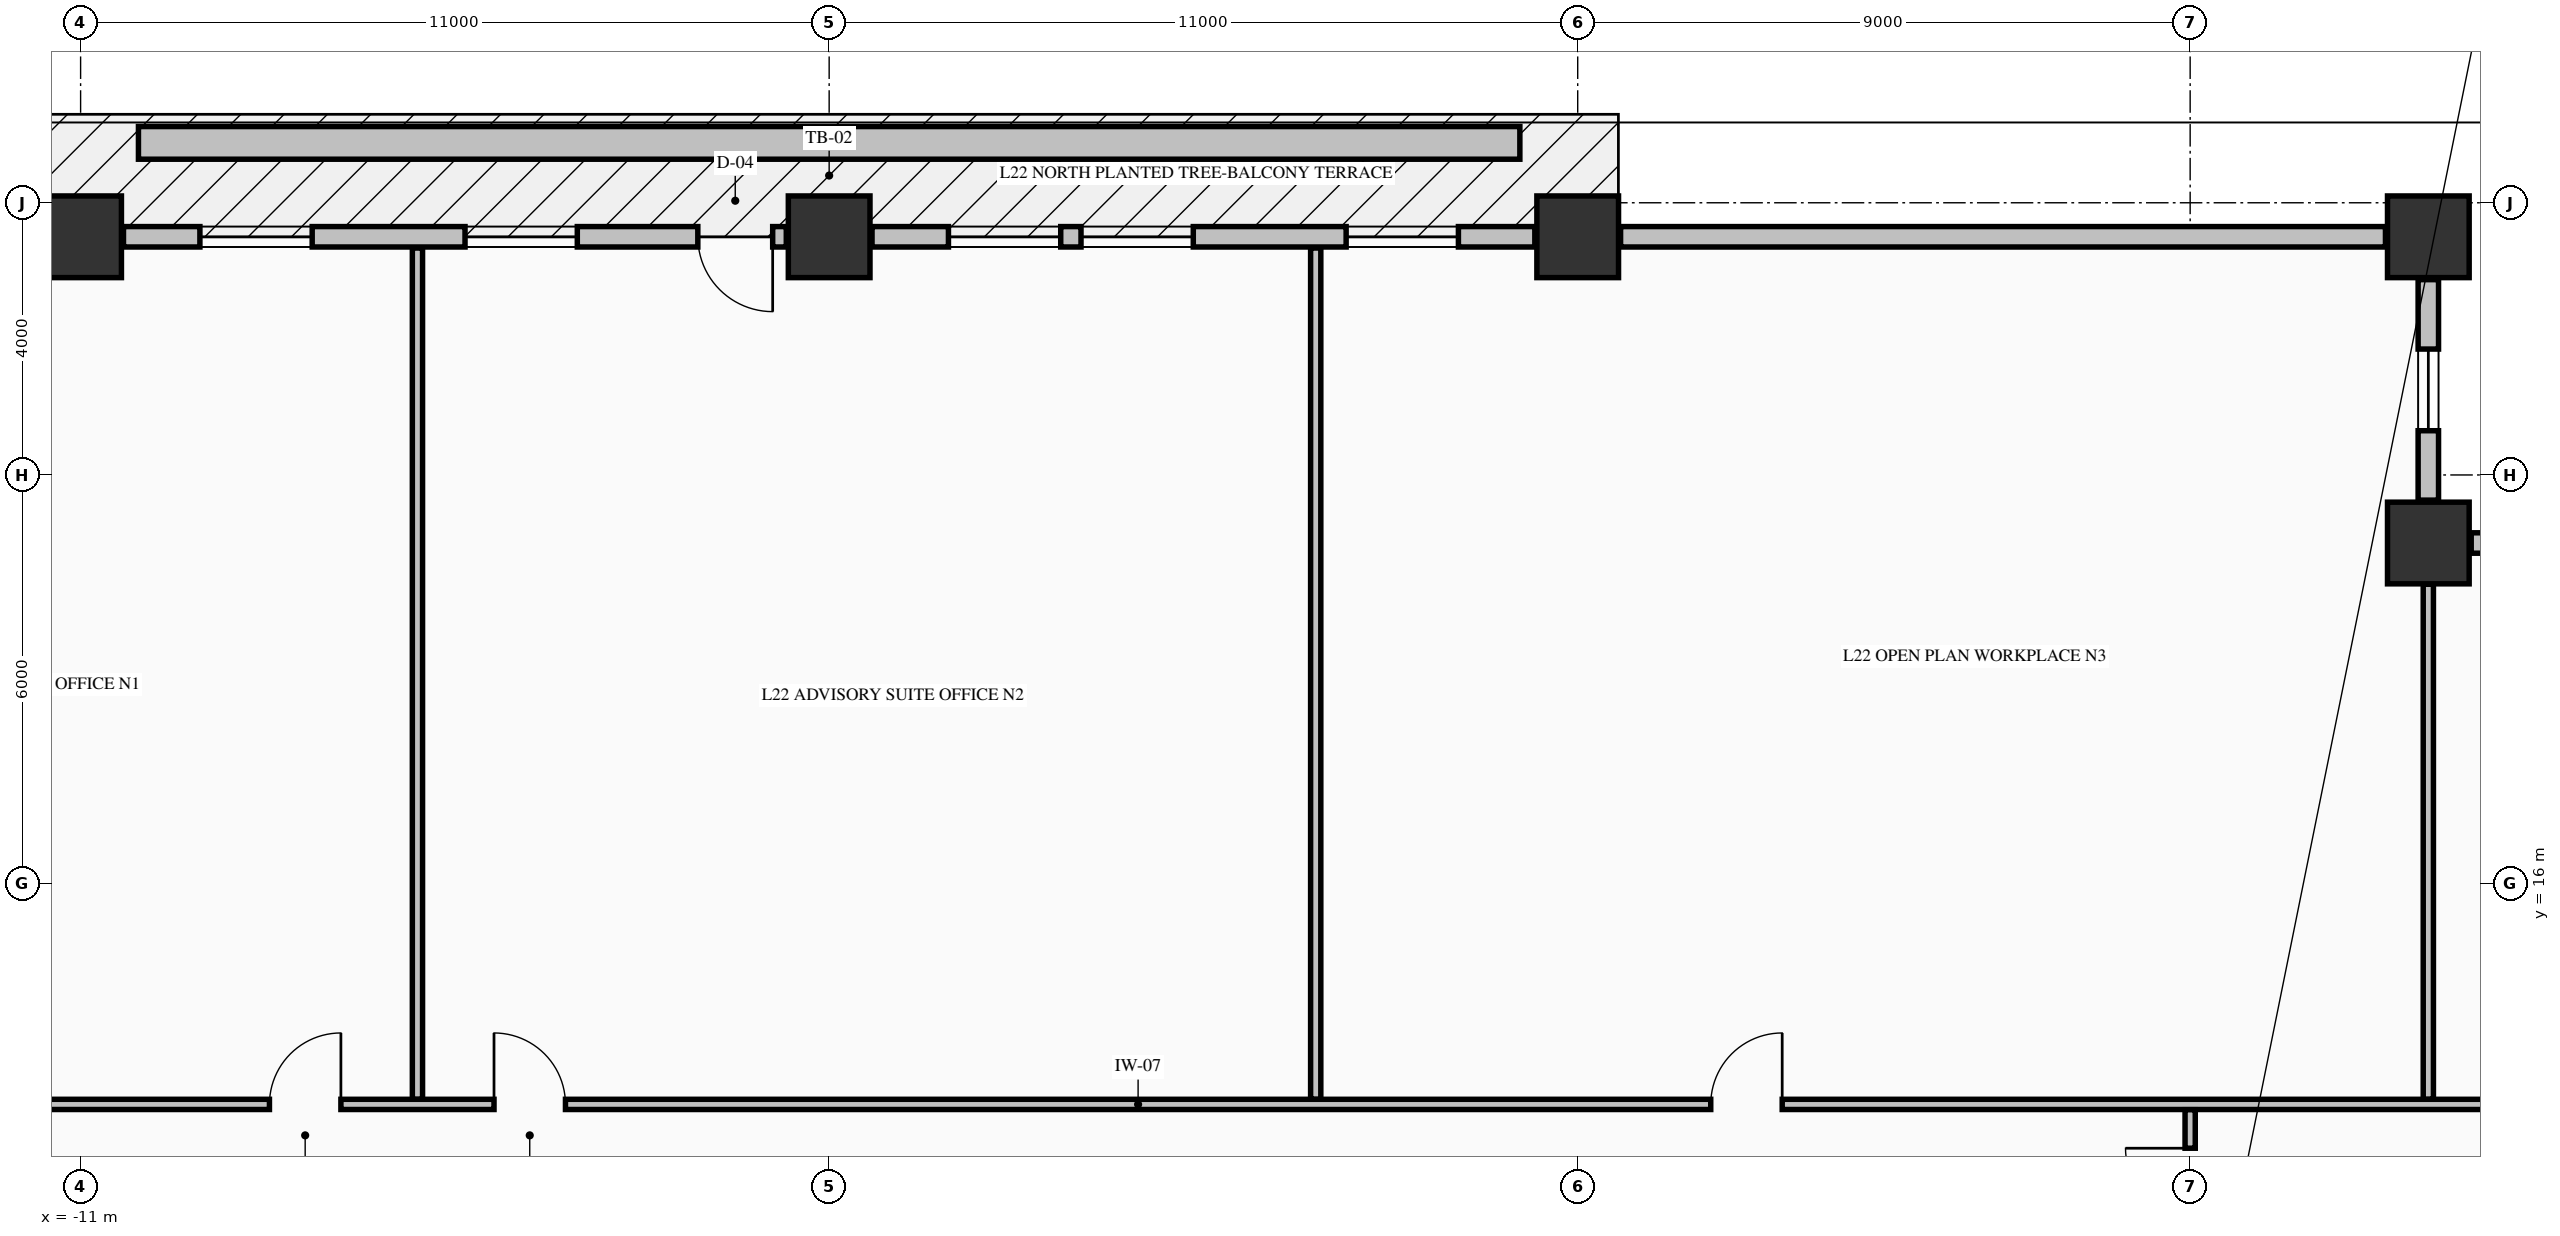
"""IFC4 building model, lengths in metres.
Left out: names, types, materials, properties, quantities, classifications, styles, units other than length and angle.
Written with IfcOpenShell. Run it as: python <this file> out.ifc"""

import sys

from ifc_helpers import new_model, si_unit, direction, frame, frame_2d, origin, origin_2d, place, context, subcontext, project, spatial, rectangle, extrude, element, fill, save


model = new_model("IFC4")
c1 = context("Model", 3, precision=1e-05, world=origin(), true_north=direction((0.0, 1.0)))
c2 = subcontext(c1, "Body", "Model", "MODEL_VIEW")
j1 = project(units=[si_unit("LENGTHUNIT", "METRE"), si_unit("PLANEANGLEUNIT", "RADIAN")], contexts=[c1])
p1 = place(None, origin())
s1 = spatial("IfcSite", under=j1, at=p1, CompositionType="ELEMENT")
p2 = place(p1, origin())
s2 = spatial("IfcBuilding", under=s1, at=p2, CompositionType="ELEMENT")
p3 = place(p2, frame((0.0, 0.0, 91.36)))
s3 = spatial("IfcBuildingStorey", under=s2, at=p3, CompositionType="ELEMENT", Elevation=91.36)
for number, where, z_axis, x_axis in (
    (1, (-11.0, 25.5, -0.25), (0.0, 0.0, 1.0), (1.0, 0.0, 0.0)),
    (2, (0.0, 25.5, -0.25), (0.0, 0.0, 1.0), (1.0, 0.0, 0.0)),
    (3, (11.0, 25.5, -0.25), (0.0, 0.0, 1.0), (1.0, 0.0, 0.0)),
    (4, (23.5, 25.5, -0.25), (0.0, 0.0, 1.0), (1.0, 0.0, 0.0)),
    (5, (23.5, 21.0, -0.25), (0.0, 0.0, 1.0), (1.0, 0.0, 0.0)),
):
    element("IfcColumn", number, at=place(p3, frame(where, z_axis=z_axis, x_axis=x_axis)), inside=s3, PredefinedType="COLUMN", context=c2, shape_type="SweptSolid", body=[
        extrude(rectangle(XDim=1.2, YDim=1.2, at=origin_2d()), origin(), (0.0, 0.0, 1.0), 3.57),
    ])
p4 = place(p3, frame((27.37, 21.0, 0.0), z_axis=(0.0, 0.0, 1.0), x_axis=(-1.0, 0.0, 0.0)))
e6 = element("IfcWall", 6, at=p4, inside=s3, PredefinedType="STANDARD", context=c2, shape_type="SweptSolid", body=[
    extrude(rectangle(XDim=3.24, YDim=0.3, at=frame_2d((1.62, 0.0))), origin(), (0.0, 0.0, 1.0), 2.712),
])
p5 = place(p4, frame((1.02, 0.0, 0.82)))
e7 = element("IfcOpeningElement", 7, at=p5, cuts=e6, PredefinedType="OPENING", context=c2, shape_type="SweptSolid", body=[
    extrude(rectangle(XDim=1.2, YDim=1.65, at=frame_2d((0.6, 0.825))), frame((0.0, 0.16, 0.0), z_axis=(0.0, -1.0, 0.0), x_axis=(1.0, 0.0, 0.0)), (0.0, 0.0, 1.0), 0.32),
])
p6 = place(p3, frame((23.5, 21.63, 0.0), z_axis=(0.0, 0.0, 1.0), x_axis=(0.0, 1.0, 0.0)))
e8 = element("IfcWall", 8, at=p6, inside=s3, PredefinedType="STANDARD", context=c2, shape_type="SweptSolid", body=[
    extrude(rectangle(XDim=3.24, YDim=0.3, at=frame_2d((1.62, 0.0))), origin(), (0.0, 0.0, 1.0), 2.712),
])
p7 = place(p6, frame((1.02, 0.0, 0.82)))
e9 = element("IfcOpeningElement", 9, at=p7, cuts=e8, PredefinedType="OPENING", context=c2, shape_type="SweptSolid", body=[
    extrude(rectangle(XDim=1.2, YDim=1.65, at=frame_2d((0.6, 0.825))), frame((0.0, 0.16, 0.0), z_axis=(0.0, -1.0, 0.0), x_axis=(1.0, 0.0, 0.0)), (0.0, 0.0, 1.0), 0.32),
])
p8 = place(p3, frame((-0.63, 25.5, 0.0), z_axis=(0.0, 0.0, 1.0), x_axis=(-1.0, 0.0, 0.0)))
e10 = element("IfcWall", 10, at=p8, inside=s3, PredefinedType="STANDARD", context=c2, shape_type="SweptSolid", body=[
    extrude(rectangle(XDim=9.74, YDim=0.3, at=frame_2d((4.87, 0.0))), origin(), (0.0, 0.0, 1.0), 2.712),
])
p9 = place(p8, frame((0.2, 0.0, 0.0)))
e11 = element("IfcOpeningElement", 11, at=p9, cuts=e10, PredefinedType="OPENING", context=c2, shape_type="SweptSolid", body=[
    extrude(rectangle(XDim=1.1, YDim=2.15, at=frame_2d((0.55, 1.075))), frame((0.0, 0.16, 0.0), z_axis=(0.0, -1.0, 0.0), x_axis=(1.0, 0.0, 0.0)), (0.0, 0.0, 1.0), 0.32),
])
p10 = place(p8, frame((3.071, 0.0, 0.8)))
e12 = element("IfcOpeningElement", 12, at=p10, cuts=e10, PredefinedType="OPENING", context=c2, shape_type="SweptSolid", body=[
    extrude(rectangle(XDim=1.65, YDim=1.7, at=frame_2d((0.825, 0.85))), frame((0.0, 0.16, 0.0), z_axis=(0.0, -1.0, 0.0), x_axis=(1.0, 0.0, 0.0)), (0.0, 0.0, 1.0), 0.32),
])
p11 = place(p8, frame((6.967, 0.0, 0.8)))
e13 = element("IfcOpeningElement", 13, at=p11, cuts=e10, PredefinedType="OPENING", context=c2, shape_type="SweptSolid", body=[
    extrude(rectangle(XDim=1.65, YDim=1.7, at=frame_2d((0.825, 0.85))), frame((0.0, 0.16, 0.0), z_axis=(0.0, -1.0, 0.0), x_axis=(1.0, 0.0, 0.0)), (0.0, 0.0, 1.0), 0.32),
])
p12 = place(p3, frame((10.37, 25.5, 0.0), z_axis=(0.0, 0.0, 1.0), x_axis=(-1.0, 0.0, 0.0)))
e14 = element("IfcWall", 14, at=p12, inside=s3, PredefinedType="STANDARD", context=c2, shape_type="SweptSolid", body=[
    extrude(rectangle(XDim=9.74, YDim=0.3, at=frame_2d((4.87, 0.0))), origin(), (0.0, 0.0, 1.0), 2.712),
])
p13 = place(p12, frame((1.123, 0.0, 0.8)))
e15 = element("IfcOpeningElement", 15, at=p13, cuts=e14, PredefinedType="OPENING", context=c2, shape_type="SweptSolid", body=[
    extrude(rectangle(XDim=1.65, YDim=1.7, at=frame_2d((0.825, 0.85))), frame((0.0, 0.16, 0.0), z_axis=(0.0, -1.0, 0.0), x_axis=(1.0, 0.0, 0.0)), (0.0, 0.0, 1.0), 0.32),
])
p14 = place(p12, frame((5.019, 0.0, 0.8)))
e16 = element("IfcOpeningElement", 16, at=p14, cuts=e14, PredefinedType="OPENING", context=c2, shape_type="SweptSolid", body=[
    extrude(rectangle(XDim=1.65, YDim=1.7, at=frame_2d((0.825, 0.85))), frame((0.0, 0.16, 0.0), z_axis=(0.0, -1.0, 0.0), x_axis=(1.0, 0.0, 0.0)), (0.0, 0.0, 1.0), 0.32),
])
p15 = place(p12, frame((6.967, 0.0, 0.8)))
e17 = element("IfcOpeningElement", 17, at=p15, cuts=e14, PredefinedType="OPENING", context=c2, shape_type="SweptSolid", body=[
    extrude(rectangle(XDim=1.65, YDim=1.7, at=frame_2d((0.825, 0.85))), frame((0.0, 0.16, 0.0), z_axis=(0.0, -1.0, 0.0), x_axis=(1.0, 0.0, 0.0)), (0.0, 0.0, 1.0), 0.32),
])
p16 = place(p3, frame((22.87, 25.5, 0.0), z_axis=(0.0, 0.0, 1.0), x_axis=(-1.0, 0.0, 0.0)))
e18 = element("IfcWall", 18, at=p16, inside=s3, PredefinedType="STANDARD", context=c2, shape_type="SweptSolid", body=[
    extrude(rectangle(XDim=11.24, YDim=0.3, at=frame_2d((5.62, 0.0))), origin(), (0.0, 0.0, 1.0), 2.712),
])
p17 = place(p3, frame((-22.835, 12.75, 0.0), z_axis=(0.0, 0.0, 1.0), x_axis=(1.0, 0.0, 0.0)))
e19 = element("IfcWall", 19, at=p17, inside=s3, PredefinedType="PARTITIONING", context=c2, shape_type="SweptSolid", body=[
    extrude(rectangle(XDim=50.67, YDim=0.15, at=frame_2d((25.335, 0.0))), origin(), (0.0, 0.0, 1.0), 3.32),
])
p18 = place(p17, frame((14.61, 0.0, 0.0)))
e20 = element("IfcOpeningElement", 20, at=p18, cuts=e19, PredefinedType="OPENING", context=c2, shape_type="SweptSolid", body=[
    extrude(rectangle(XDim=1.05, YDim=2.15, at=frame_2d((0.525, 1.075))), frame((0.0, 0.085, 0.0), z_axis=(0.0, -1.0, 0.0), x_axis=(1.0, 0.0, 0.0)), (0.0, 0.0, 1.0), 0.17),
])
p19 = place(p17, frame((17.91, 0.0, 0.0)))
e21 = element("IfcOpeningElement", 21, at=p19, cuts=e19, PredefinedType="OPENING", context=c2, shape_type="SweptSolid", body=[
    extrude(rectangle(XDim=1.05, YDim=2.15, at=frame_2d((0.525, 1.075))), frame((0.0, 0.085, 0.0), z_axis=(0.0, -1.0, 0.0), x_axis=(1.0, 0.0, 0.0)), (0.0, 0.0, 1.0), 0.17),
])
p20 = place(p17, frame((35.79, 0.0, 0.0)))
e22 = element("IfcOpeningElement", 22, at=p20, cuts=e19, PredefinedType="OPENING", context=c2, shape_type="SweptSolid", body=[
    extrude(rectangle(XDim=1.05, YDim=2.15, at=frame_2d((0.525, 1.075))), frame((0.0, 0.085, 0.0), z_axis=(0.0, -1.0, 0.0), x_axis=(1.0, 0.0, 0.0)), (0.0, 0.0, 1.0), 0.17),
])
for number, where, z_axis, x_axis in (
    (23, (-6.05, 12.828, 0.0), (0.0, 0.0, 1.0), (0.0, 1.0, 0.0)),
    (24, (7.15, 12.828, 0.0), (0.0, 0.0, 1.0), (0.0, 1.0, 0.0)),
):
    element("IfcWall", number, at=place(p3, frame(where, z_axis=z_axis, x_axis=x_axis)), inside=s3, PredefinedType="PARTITIONING", context=c2, shape_type="SweptSolid", body=[
        extrude(rectangle(XDim=12.507, YDim=0.15, at=frame_2d((6.253, 0.0))), origin(), (0.0, 0.0, 1.0), 3.32),
    ])
p21 = place(p3, frame((20.0, 11.006, 0.0), z_axis=(0.0, 0.0, 1.0), x_axis=(0.0, 1.0, 0.0)))
e25 = element("IfcWall", 25, at=p21, inside=s3, PredefinedType="PARTITIONING", context=c2, shape_type="SweptSolid", body=[
    extrude(rectangle(XDim=1.666, YDim=0.15, at=frame_2d((0.833, 0.0))), origin(), (0.0, 0.0, 1.0), 2.81),
])
p22 = place(p21, frame((0.15, 0.0, 0.0)))
e26 = element("IfcOpeningElement", 26, at=p22, cuts=e25, PredefinedType="OPENING", context=c2, shape_type="SweptSolid", body=[
    extrude(rectangle(XDim=0.95, YDim=2.15, at=frame_2d((0.475, 1.075))), frame((0.0, 0.085, 0.0), z_axis=(0.0, -1.0, 0.0), x_axis=(1.0, 0.0, 0.0)), (0.0, 0.0, 1.0), 0.17),
])
p23 = place(p3, frame((23.5, 12.828, 0.0), z_axis=(0.0, 0.0, 1.0), x_axis=(0.0, 1.0, 0.0)))
e27 = element("IfcWall", 27, at=p23, inside=s3, PredefinedType="PARTITIONING", context=c2, shape_type="SweptSolid", body=[
    extrude(rectangle(XDim=7.566, YDim=0.15, at=frame_2d((3.783, 0.0))), origin(), (0.0, 0.0, 1.0), 3.32),
])
p24 = place(p3, frame((-10.15, 26.88, -0.04), z_axis=(0.0, 0.0, 1.0), x_axis=(1.0, 0.0, 0.0)))
e28 = element("IfcWall", 28, at=p24, inside=s3, PredefinedType="PARAPET", context=c2, shape_type="SweptSolid", body=[
    extrude(rectangle(XDim=20.3, YDim=0.48, at=frame_2d((10.15, 0.0))), origin(), (0.0, 0.0, 1.0), 0.52),
])
p25 = place(p7, origin())
e29 = element("IfcWindow", 29, at=p25, inside=s3, PartitioningType="SINGLE_PANEL", PredefinedType="WINDOW", context=c2, shape_type="SweptSolid", body=[
    extrude(rectangle(XDim=1.2, YDim=1.65, at=frame_2d((0.6, 0.825))), frame((0.0, 0.03, 0.0), z_axis=(0.0, -1.0, 0.0), x_axis=(1.0, 0.0, 0.0)), (0.0, 0.0, 1.0), 0.06),
])
fill(e9, e29)
p26 = place(p9, origin())
e30 = element("IfcDoor", 30, at=p26, inside=s3, OperationType="SINGLE_SWING_LEFT", PredefinedType="DOOR", context=c2, shape_type="SweptSolid", body=[
    extrude(rectangle(XDim=1.1, YDim=2.15, at=frame_2d((0.55, 1.075))), frame((0.0, 0.025, 0.0), z_axis=(0.0, -1.0, 0.0), x_axis=(1.0, 0.0, 0.0)), (0.0, 0.0, 1.0), 0.05),
])
fill(e11, e30)
p27 = place(p10, origin())
e31 = element("IfcWindow", 31, at=p27, inside=s3, PartitioningType="SINGLE_PANEL", PredefinedType="WINDOW", context=c2, shape_type="SweptSolid", body=[
    extrude(rectangle(XDim=1.65, YDim=1.7, at=frame_2d((0.825, 0.85))), frame((0.0, 0.03, 0.0), z_axis=(0.0, -1.0, 0.0), x_axis=(1.0, 0.0, 0.0)), (0.0, 0.0, 1.0), 0.06),
])
fill(e12, e31)
p28 = place(p11, origin())
e32 = element("IfcWindow", 32, at=p28, inside=s3, PartitioningType="SINGLE_PANEL", PredefinedType="WINDOW", context=c2, shape_type="SweptSolid", body=[
    extrude(rectangle(XDim=1.65, YDim=1.7, at=frame_2d((0.825, 0.85))), frame((0.0, 0.03, 0.0), z_axis=(0.0, -1.0, 0.0), x_axis=(1.0, 0.0, 0.0)), (0.0, 0.0, 1.0), 0.06),
])
fill(e13, e32)
p29 = place(p13, origin())
e33 = element("IfcWindow", 33, at=p29, inside=s3, PartitioningType="SINGLE_PANEL", PredefinedType="WINDOW", context=c2, shape_type="SweptSolid", body=[
    extrude(rectangle(XDim=1.65, YDim=1.7, at=frame_2d((0.825, 0.85))), frame((0.0, 0.03, 0.0), z_axis=(0.0, -1.0, 0.0), x_axis=(1.0, 0.0, 0.0)), (0.0, 0.0, 1.0), 0.06),
])
fill(e15, e33)
p30 = place(p14, origin())
e34 = element("IfcWindow", 34, at=p30, inside=s3, PartitioningType="SINGLE_PANEL", PredefinedType="WINDOW", context=c2, shape_type="SweptSolid", body=[
    extrude(rectangle(XDim=1.65, YDim=1.7, at=frame_2d((0.825, 0.85))), frame((0.0, 0.03, 0.0), z_axis=(0.0, -1.0, 0.0), x_axis=(1.0, 0.0, 0.0)), (0.0, 0.0, 1.0), 0.06),
])
fill(e16, e34)
p31 = place(p15, origin())
e35 = element("IfcWindow", 35, at=p31, inside=s3, PartitioningType="SINGLE_PANEL", PredefinedType="WINDOW", context=c2, shape_type="SweptSolid", body=[
    extrude(rectangle(XDim=1.65, YDim=1.7, at=frame_2d((0.825, 0.85))), frame((0.0, 0.03, 0.0), z_axis=(0.0, -1.0, 0.0), x_axis=(1.0, 0.0, 0.0)), (0.0, 0.0, 1.0), 0.06),
])
fill(e17, e35)
p32 = place(p18, origin())
e36 = element("IfcDoor", 36, at=p32, inside=s3, OperationType="SINGLE_SWING_RIGHT", PredefinedType="DOOR", context=c2, shape_type="SweptSolid", body=[
    extrude(rectangle(XDim=1.05, YDim=2.15, at=frame_2d((0.525, 1.075))), frame((0.0, 0.025, 0.0), z_axis=(0.0, -1.0, 0.0), x_axis=(1.0, 0.0, 0.0)), (0.0, 0.0, 1.0), 0.05),
])
fill(e20, e36)
p33 = place(p19, origin())
e37 = element("IfcDoor", 37, at=p33, inside=s3, OperationType="SINGLE_SWING_LEFT", PredefinedType="DOOR", context=c2, shape_type="SweptSolid", body=[
    extrude(rectangle(XDim=1.05, YDim=2.15, at=frame_2d((0.525, 1.075))), frame((0.0, 0.025, 0.0), z_axis=(0.0, -1.0, 0.0), x_axis=(1.0, 0.0, 0.0)), (0.0, 0.0, 1.0), 0.05),
])
fill(e21, e37)
p34 = place(p20, origin())
e38 = element("IfcDoor", 38, at=p34, inside=s3, OperationType="SINGLE_SWING_RIGHT", PredefinedType="DOOR", context=c2, shape_type="SweptSolid", body=[
    extrude(rectangle(XDim=1.05, YDim=2.15, at=frame_2d((0.525, 1.075))), frame((0.0, 0.025, 0.0), z_axis=(0.0, -1.0, 0.0), x_axis=(1.0, 0.0, 0.0)), (0.0, 0.0, 1.0), 0.05),
])
fill(e22, e38)
p35 = place(p22, origin())
e39 = element("IfcDoor", 39, at=p35, inside=s3, OperationType="SINGLE_SWING_RIGHT", PredefinedType="DOOR", context=c2, shape_type="SweptSolid", body=[
    extrude(rectangle(XDim=0.95, YDim=2.15, at=frame_2d((0.475, 1.075))), frame((0.0, 0.025, 0.0), z_axis=(0.0, -1.0, 0.0), x_axis=(1.0, 0.0, 0.0)), (0.0, 0.0, 1.0), 0.05),
])
fill(e26, e39)
save(model, sys.argv[1])
